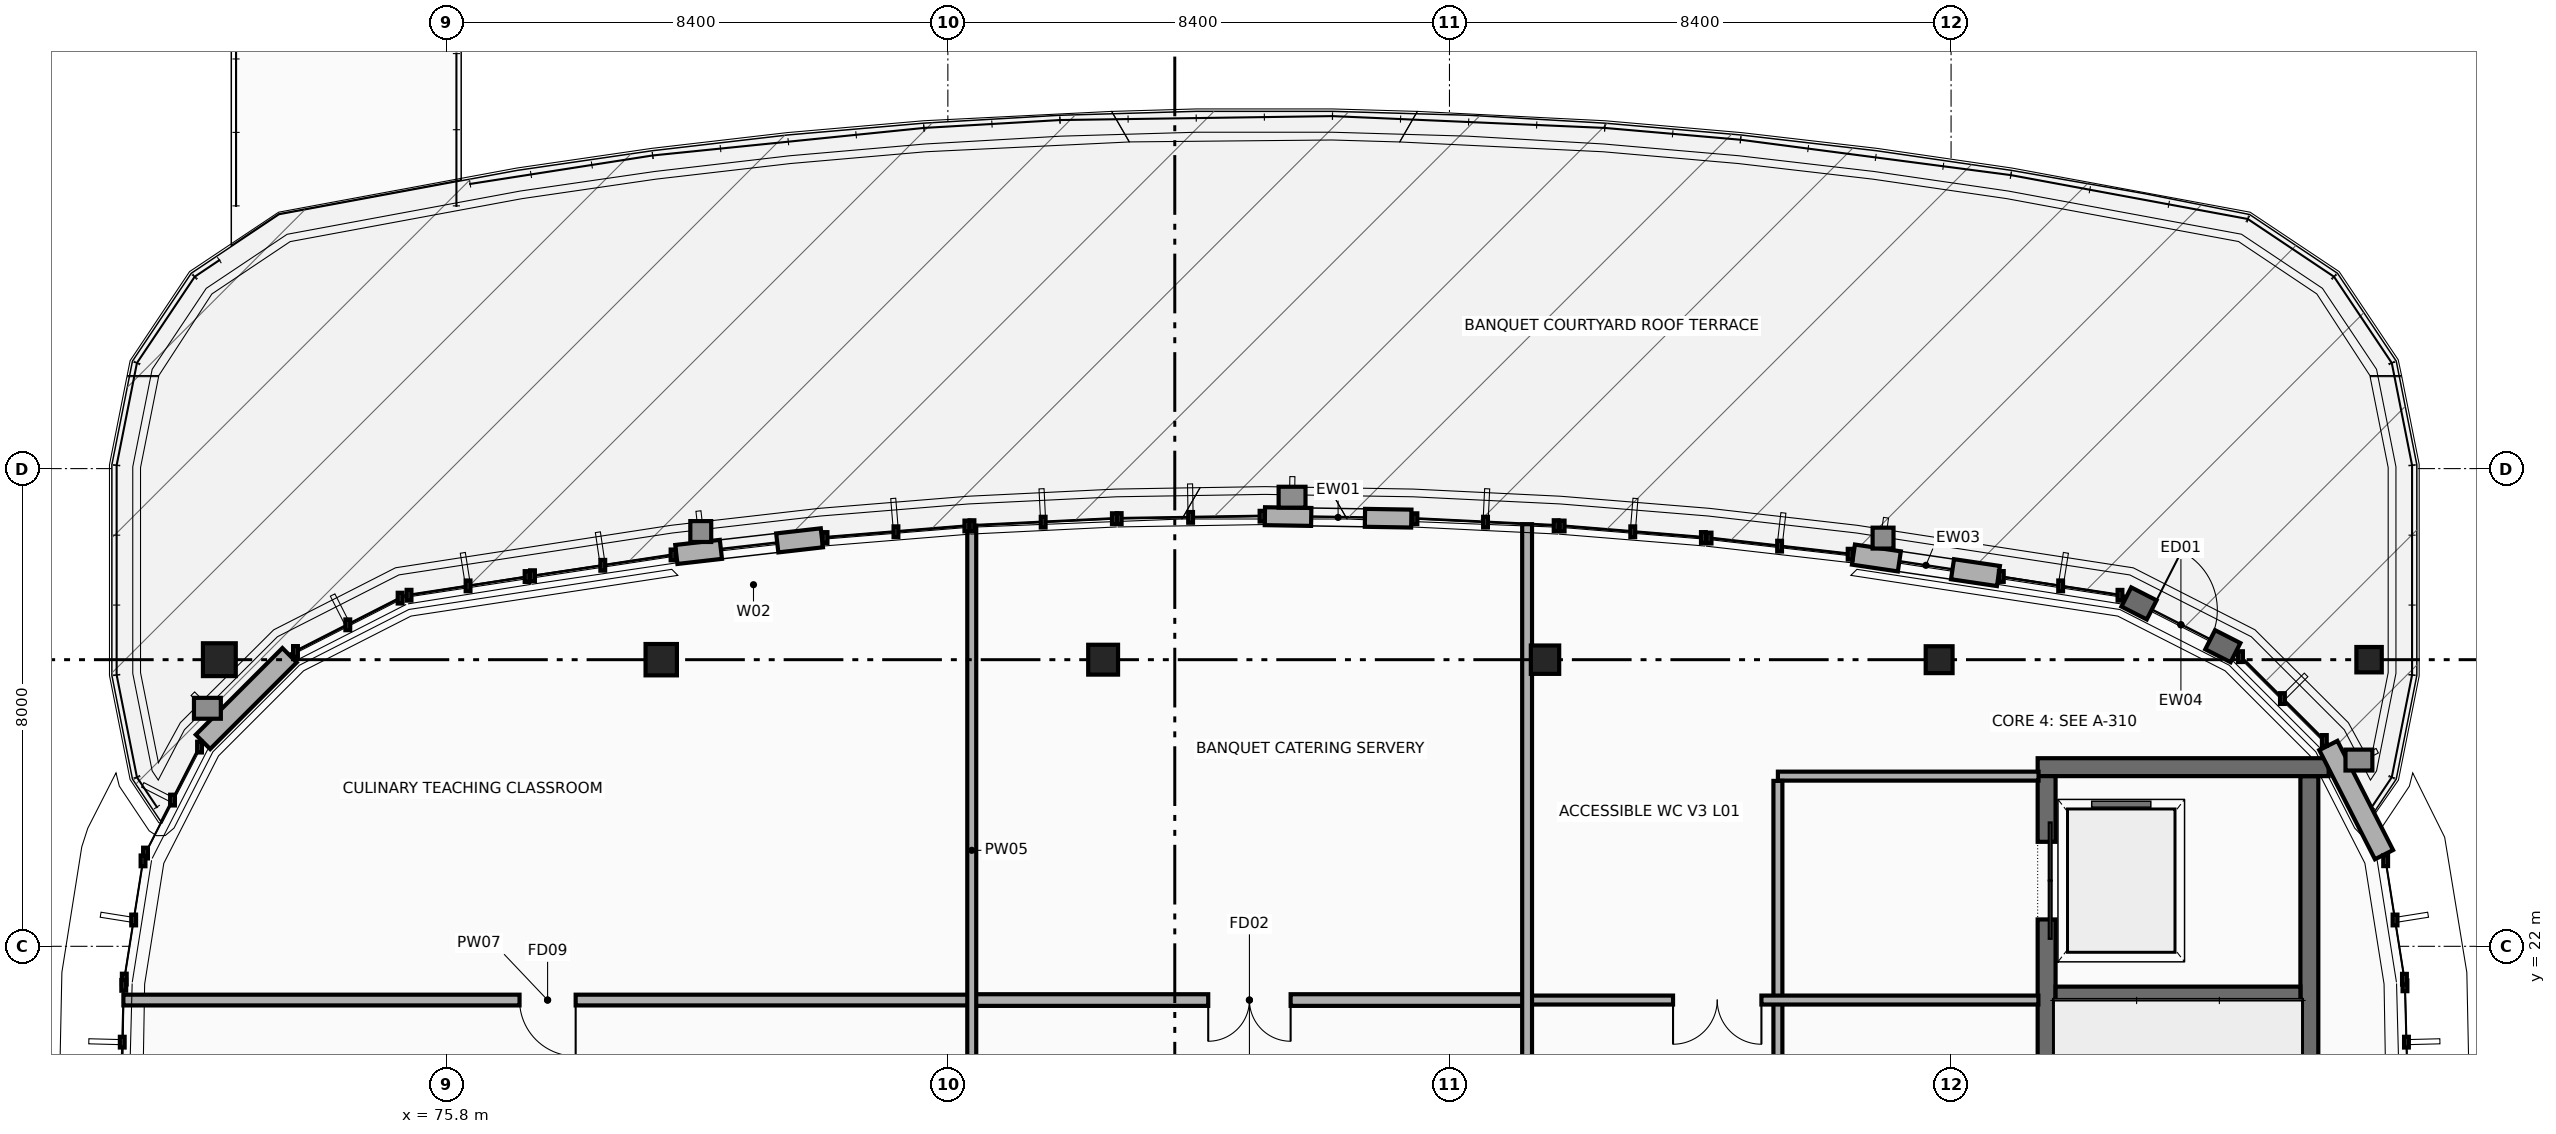
"""IFC4 building model, lengths in metres.
Left out: names, types, materials, properties, quantities, classifications, styles, units other than length and angle.
Written with IfcOpenShell. Run it as: python <this file> out.ifc"""

import sys

from ifc_helpers import new_model, si_unit, direction, frame, frame_2d, origin, origin_2d, place, context, subcontext, project, spatial, rectangle, extrude, element, fill, save


model = new_model("IFC4")
c1 = context("Model", 3, precision=1e-05, world=origin(), true_north=direction((0.0, 1.0)))
c2 = subcontext(c1, "Body", "Model", "MODEL_VIEW")
j1 = project(units=[si_unit("LENGTHUNIT", "METRE"), si_unit("PLANEANGLEUNIT", "RADIAN")], contexts=[c1])
p1 = place(None, origin())
s1 = spatial("IfcSite", under=j1, at=p1, CompositionType="ELEMENT")
p2 = place(p1, origin())
s2 = spatial("IfcBuilding", under=s1, at=p2, CompositionType="ELEMENT")
p3 = place(p2, frame((0.0, 0.0, 4.8)))
s3 = spatial("IfcBuildingStorey", under=s2, at=p3, CompositionType="ELEMENT", Elevation=4.8)
p4 = place(p3, frame((107.0, 13.55, 0.0), z_axis=(0.0, 0.0, 1.0), x_axis=(0.0, 1.0, 0.0)))
e1 = element("IfcWall", 1, at=p4, inside=s3, PredefinedType="SHEAR", context=c2, shape_type="SweptSolid", body=[
    extrude(rectangle(XDim=11.3, YDim=0.3, at=frame_2d((5.65, 0.0))), origin(), (0.0, 0.0, 1.0), 3.9),
])
p5 = place(p3, frame((107.323, 25.0, 0.0), z_axis=(0.0, 0.0, 1.0), x_axis=(-1.0, 0.0, 0.0)))
e2 = element("IfcWall", 2, at=p5, inside=s3, PredefinedType="SHEAR", context=c2, shape_type="SweptSolid", body=[
    extrude(rectangle(XDim=4.873, YDim=0.3, at=frame_2d((2.437, 0.0))), origin(), (0.0, 0.0, 1.0), 3.9),
])
p6 = place(p3, frame((102.6, 24.85, 0.0), z_axis=(0.0, 0.0, 1.0), x_axis=(0.0, -1.0, 0.0)))
e3 = element("IfcWall", 3, at=p6, inside=s3, PredefinedType="SHEAR", context=c2, shape_type="SweptSolid", body=[
    extrude(rectangle(XDim=11.3, YDim=0.3, at=frame_2d((5.65, 0.0))), origin(), (0.0, 0.0, 1.0), 3.9),
])
p7 = place(p6, frame((1.1, 0.0, 0.0)))
e4 = element("IfcOpeningElement", 4, at=p7, cuts=e3, PredefinedType="OPENING", context=c2, shape_type="SweptSolid", body=[
    extrude(rectangle(XDim=1.3, YDim=2.25, at=frame_2d((0.65, 1.125))), frame((0.0, 0.16, 0.0), z_axis=(0.0, -1.0, 0.0), x_axis=(1.0, 0.0, 0.0)), (0.0, 0.0, 1.0), 0.32),
])
p8 = place(p6, frame((9.97, 0.0, 0.0)))
e5 = element("IfcOpeningElement", 5, at=p8, cuts=e3, PredefinedType="OPENING", context=c2, shape_type="SweptSolid", body=[
    extrude(rectangle(XDim=1.06, YDim=2.15, at=frame_2d((0.53, 1.075))), frame((0.0, 0.16, 0.0), z_axis=(0.0, -1.0, 0.0), x_axis=(1.0, 0.0, 0.0)), (0.0, 0.0, 1.0), 0.32),
])
p9 = place(p3, frame((102.75, 21.2, 0.0), z_axis=(0.0, 0.0, 1.0), x_axis=(1.0, 0.0, 0.0)))
e6 = element("IfcWall", 6, at=p9, inside=s3, PredefinedType="SHEAR", context=c2, shape_type="SweptSolid", body=[
    extrude(rectangle(XDim=4.1, YDim=0.25, at=frame_2d((2.05, 0.0))), origin(), (0.0, 0.0, 1.0), 3.9),
])
p10 = place(p3, frame((72.0, 26.8, 0.0), z_axis=(0.0, 0.0, 1.0), x_axis=(1.0, 0.0, 0.0)))
e7 = element("IfcColumn", 7, at=p10, inside=s3, PredefinedType="COLUMN", context=c2, shape_type="SweptSolid", body=[
    extrude(rectangle(XDim=0.55, YDim=0.55, at=origin_2d()), origin(), (0.0, 0.0, 1.0), 3.9),
])
p11 = place(p3, frame((79.4, 26.8, 0.0), z_axis=(0.0, 0.0, 1.0), x_axis=(1.0, 0.0, 0.0)))
e8 = element("IfcColumn", 8, at=p11, inside=s3, PredefinedType="COLUMN", context=c2, shape_type="SweptSolid", body=[
    extrude(rectangle(XDim=0.525, YDim=0.525, at=origin_2d()), origin(), (0.0, 0.0, 1.0), 3.9),
])
p12 = place(p3, frame((86.8, 26.8, 0.0), z_axis=(0.0, 0.0, 1.0), x_axis=(1.0, 0.0, 0.0)))
e9 = element("IfcColumn", 9, at=p12, inside=s3, PredefinedType="COLUMN", context=c2, shape_type="SweptSolid", body=[
    extrude(rectangle(XDim=0.5, YDim=0.5, at=origin_2d()), origin(), (0.0, 0.0, 1.0), 3.9),
])
p13 = place(p3, frame((94.2, 26.8, 0.0), z_axis=(0.0, 0.0, 1.0), x_axis=(1.0, 0.0, 0.0)))
e10 = element("IfcColumn", 10, at=p13, inside=s3, PredefinedType="COLUMN", context=c2, shape_type="SweptSolid", body=[
    extrude(rectangle(XDim=0.475, YDim=0.475, at=origin_2d()), origin(), (0.0, 0.0, 1.0), 3.9),
])
p14 = place(p3, frame((100.8, 26.8, 0.0), z_axis=(0.0, 0.0, 1.0), x_axis=(1.0, 0.0, 0.0)))
e11 = element("IfcColumn", 11, at=p14, inside=s3, PredefinedType="COLUMN", context=c2, shape_type="SweptSolid", body=[
    extrude(rectangle(XDim=0.45, YDim=0.45, at=origin_2d()), origin(), (0.0, 0.0, 1.0), 3.9),
])
p15 = place(p3, frame((108.0, 26.8, 0.0), z_axis=(0.0, 0.0, 1.0), x_axis=(1.0, 0.0, 0.0)))
e12 = element("IfcColumn", 12, at=p15, inside=s3, PredefinedType="COLUMN", context=c2, shape_type="SweptSolid", body=[
    extrude(rectangle(XDim=0.425, YDim=0.425, at=origin_2d()), origin(), (0.0, 0.0, 1.0), 3.9),
])
p16 = place(p3, frame((107.318, 25.363, 0.0), z_axis=(0.0, 0.0, 1.0), x_axis=(0.454148561407, -0.890925970085, 0.0)))
e13 = element("IfcWall", 13, at=p16, inside=s3, PredefinedType="STANDARD", context=c2, shape_type="SweptSolid", body=[
    extrude(rectangle(XDim=2.052, YDim=0.34, at=frame_2d((1.026, 0.0))), origin(), (0.0, 0.0, 1.0), 2.97),
])
p17 = place(p3, frame((103.935, 27.85, 0.0), z_axis=(0.0, 0.0, 1.0), x_axis=(0.890853274035, -0.454291144686, 0.0)))
e14 = element("IfcWall", 14, at=p17, inside=s3, PredefinedType="STANDARD", context=c2, shape_type="SweptSolid", body=[
    extrude(rectangle(XDim=2.052, YDim=0.36, at=frame_2d((1.026, 0.0))), origin(), (0.0, 0.0, 1.0), 3.188),
])
p18 = place(p17, frame((0.476, 0.0, 0.0)))
e15 = element("IfcOpeningElement", 15, at=p18, cuts=e14, PredefinedType="OPENING", context=c2, shape_type="SweptSolid", body=[
    extrude(rectangle(XDim=1.1, YDim=2.2, at=frame_2d((0.55, 1.1))), frame((0.0, 0.19, 0.0), z_axis=(0.0, -1.0, 0.0), x_axis=(1.0, 0.0, 0.0)), (0.0, 0.0, 1.0), 0.38),
])
p19 = place(p3, frame((99.365, 28.56, 0.0), z_axis=(0.0, 0.0, 1.0), x_axis=(0.98923708278, -0.146321543365, 0.0)))
e16 = element("IfcWall", 16, at=p19, inside=s3, PredefinedType="STANDARD", context=c2, shape_type="SweptSolid", body=[
    extrude(rectangle(XDim=2.454, YDim=0.34, at=frame_2d((1.227, 0.0))), origin(), (0.0, 0.0, 1.0), 3.612),
])
p20 = place(p19, frame((0.777, 0.0, 0.9)))
e17 = element("IfcOpeningElement", 17, at=p20, cuts=e16, PredefinedType="OPENING", context=c2, shape_type="SweptSolid", body=[
    extrude(rectangle(XDim=0.9, YDim=1.2, at=frame_2d((0.45, 0.6))), frame((0.0, 0.18, 0.0), z_axis=(0.0, -1.0, 0.0), x_axis=(1.0, 0.0, 0.0)), (0.0, 0.0, 1.0), 0.36),
])
p21 = place(p3, frame((89.509, 29.203, 0.0), z_axis=(0.0, 0.0, 1.0), x_axis=(0.999868316156, -0.01622807284, 0.0)))
e18 = element("IfcWall", 18, at=p21, inside=s3, PredefinedType="STANDARD", context=c2, shape_type="SweptSolid", body=[
    extrude(rectangle(XDim=2.452, YDim=0.3, at=frame_2d((1.226, 0.0))), origin(), (0.0, 0.0, 1.0), 3.612),
])
p22 = place(p21, frame((0.776, 0.0, 0.9)))
e19 = element("IfcOpeningElement", 19, at=p22, cuts=e18, PredefinedType="OPENING", context=c2, shape_type="SweptSolid", body=[
    extrude(rectangle(XDim=0.9, YDim=1.2, at=frame_2d((0.45, 0.6))), frame((0.0, 0.16, 0.0), z_axis=(0.0, -1.0, 0.0), x_axis=(1.0, 0.0, 0.0)), (0.0, 0.0, 1.0), 0.32),
])
p23 = place(p3, frame((79.653, 28.562, 0.0), z_axis=(0.0, 0.0, 1.0), x_axis=(0.993507947112, 0.113762731271, 0.0)))
e20 = element("IfcWall", 20, at=p23, inside=s3, PredefinedType="STANDARD", context=c2, shape_type="SweptSolid", body=[
    extrude(rectangle(XDim=2.453, YDim=0.32, at=frame_2d((1.227, 0.0))), origin(), (0.0, 0.0, 1.0), 3.612),
])
p24 = place(p23, frame((0.751, 0.0, 0.9)))
e21 = element("IfcOpeningElement", 21, at=p24, cuts=e20, PredefinedType="OPENING", context=c2, shape_type="SweptSolid", body=[
    extrude(rectangle(XDim=0.95, YDim=1.5, at=frame_2d((0.475, 0.75))), frame((0.0, 0.17, 0.0), z_axis=(0.0, -1.0, 0.0), x_axis=(1.0, 0.0, 0.0)), (0.0, 0.0, 1.0), 0.34),
])
p25 = place(p3, frame((71.726, 25.424, 0.0), z_axis=(0.0, 0.0, 1.0), x_axis=(0.707106781187, 0.707106781187, 0.0)))
e22 = element("IfcWall", 22, at=p25, inside=s3, PredefinedType="STANDARD", context=c2, shape_type="SweptSolid", body=[
    extrude(rectangle(XDim=2.051, YDim=0.34, at=frame_2d((1.025, 0.0))), origin(), (0.0, 0.0, 1.0), 3.12),
])
p26 = place(p3, frame((102.465, 24.85, 0.0), z_axis=(0.0, 0.0, 1.0), x_axis=(-1.0, 0.0, 0.0)))
e23 = element("IfcWall", 23, at=p26, inside=s3, PredefinedType="PARTITIONING", context=c2, shape_type="SweptSolid", body=[
    extrude(rectangle(XDim=4.365, YDim=0.15, at=frame_2d((2.183, 0.0))), origin(), (0.0, 0.0, 1.0), 2.995),
])
p27 = place(p3, frame((98.1, 24.77, 0.0), z_axis=(0.0, 0.0, 1.0), x_axis=(0.0, -1.0, 0.0)))
e24 = element("IfcWall", 24, at=p27, inside=s3, PredefinedType="PARTITIONING", context=c2, shape_type="SweptSolid", body=[
    extrude(rectangle(XDim=11.14, YDim=0.15, at=frame_2d((5.57, 0.0))), origin(), (0.0, 0.0, 1.0), 3.232),
])
p28 = place(p27, frame((4.88, 0.0, 0.0)))
e25 = element("IfcOpeningElement", 25, at=p28, cuts=e24, PredefinedType="OPENING", context=c2, shape_type="SweptSolid", body=[
    extrude(rectangle(XDim=1.38, YDim=2.2, at=frame_2d((0.69, 1.1))), frame((0.0, 0.085, 0.0), z_axis=(0.0, -1.0, 0.0), x_axis=(1.0, 0.0, 0.0)), (0.0, 0.0, 1.0), 0.17),
])
p29 = place(p3, frame((84.6, 21.1, 0.0), z_axis=(0.0, 0.0, 1.0), x_axis=(-1.0, 0.0, 0.0)))
e26 = element("IfcWall", 26, at=p29, inside=s3, PredefinedType="PARTITIONING", context=c2, shape_type="SweptSolid", body=[
    extrude(rectangle(XDim=14.207, YDim=0.18, at=frame_2d((7.104, 0.0))), origin(), (0.0, 0.0, 1.0), 3.095),
])
p30 = place(p29, frame((6.633, 0.0, 0.0)))
e27 = element("IfcOpeningElement", 27, at=p30, cuts=e26, PredefinedType="OPENING", context=c2, shape_type="SweptSolid", body=[
    extrude(rectangle(XDim=0.94, YDim=2.1, at=frame_2d((0.47, 1.05))), frame((0.0, 0.1, 0.0), z_axis=(0.0, -1.0, 0.0), x_axis=(1.0, 0.0, 0.0)), (0.0, 0.0, 1.0), 0.2),
])
p31 = place(p3, frame((93.9, 21.1, 0.0), z_axis=(0.0, 0.0, 1.0), x_axis=(-1.0, 0.0, 0.0)))
e28 = element("IfcWall", 28, at=p31, inside=s3, PredefinedType="PARTITIONING", context=c2, shape_type="SweptSolid", body=[
    extrude(rectangle(XDim=9.3, YDim=0.195, at=frame_2d((4.65, 0.0))), origin(), (0.0, 0.0, 1.0), 3.07),
])
p32 = place(p31, frame((3.96, 0.0, 0.0)))
e29 = element("IfcOpeningElement", 29, at=p32, cuts=e28, PredefinedType="OPENING", context=c2, shape_type="SweptSolid", body=[
    extrude(rectangle(XDim=1.38, YDim=2.2, at=frame_2d((0.69, 1.1))), frame((0.0, 0.107, 0.0), z_axis=(0.0, -1.0, 0.0), x_axis=(1.0, 0.0, 0.0)), (0.0, 0.0, 1.0), 0.215),
])
p33 = place(p3, frame((102.462, 21.1, 0.0), z_axis=(0.0, 0.0, 1.0), x_axis=(-1.0, 0.0, 0.0)))
e30 = element("IfcWall", 30, at=p33, inside=s3, PredefinedType="PARTITIONING", context=c2, shape_type="SweptSolid", body=[
    extrude(rectangle(XDim=8.562, YDim=0.15, at=frame_2d((4.281, 0.0))), origin(), (0.0, 0.0, 1.0), 2.995),
])
p34 = place(p33, frame((4.638, 0.0, 0.0)))
e31 = element("IfcOpeningElement", 31, at=p34, cuts=e30, PredefinedType="OPENING", context=c2, shape_type="SweptSolid", body=[
    extrude(rectangle(XDim=1.48, YDim=2.22, at=frame_2d((0.74, 1.11))), frame((0.0, 0.085, 0.0), z_axis=(0.0, -1.0, 0.0), x_axis=(1.0, 0.0, 0.0)), (0.0, 0.0, 1.0), 0.17),
])
p35 = place(p3, frame((84.6, 18.171, 0.0), z_axis=(0.0, 0.0, 1.0), x_axis=(0.0, 1.0, 0.0)))
e32 = element("IfcWall", 32, at=p35, inside=s3, PredefinedType="PARTITIONING", context=c2, shape_type="SweptSolid", body=[
    extrude(rectangle(XDim=10.873, YDim=0.15, at=frame_2d((5.437, 0.0))), origin(), (0.0, 0.0, 1.0), 3.236),
])
p36 = place(p3, frame((93.9, 18.171, 0.0), z_axis=(0.0, 0.0, 1.0), x_axis=(0.0, 1.0, 0.0)))
e33 = element("IfcWall", 33, at=p36, inside=s3, PredefinedType="PARTITIONING", context=c2, shape_type="SweptSolid", body=[
    extrude(rectangle(XDim=10.898, YDim=0.165, at=frame_2d((5.449, 0.0))), origin(), (0.0, 0.0, 1.0), 3.045),
])
p37 = place(p18, origin())
e34 = element("IfcDoor", 34, at=p37, inside=s3, OperationType="SINGLE_SWING_LEFT", PredefinedType="DOOR", context=c2, shape_type="SweptSolid", body=[
    extrude(rectangle(XDim=1.1, YDim=2.2, at=frame_2d((0.55, 1.1))), frame((0.0, 0.025, 0.0), z_axis=(0.0, -1.0, 0.0), x_axis=(1.0, 0.0, 0.0)), (0.0, 0.0, 1.0), 0.05),
])
fill(e15, e34)
p38 = place(p20, origin())
e35 = element("IfcWindow", 35, at=p38, inside=s3, PartitioningType="SINGLE_PANEL", PredefinedType="WINDOW", context=c2, shape_type="SweptSolid", body=[
    extrude(rectangle(XDim=0.9, YDim=1.2, at=frame_2d((0.45, 0.6))), frame((0.0, 0.03, 0.0), z_axis=(0.0, -1.0, 0.0), x_axis=(1.0, 0.0, 0.0)), (0.0, 0.0, 1.0), 0.06),
])
fill(e17, e35)
p39 = place(p22, origin())
e36 = element("IfcWindow", 36, at=p39, inside=s3, PartitioningType="SINGLE_PANEL", PredefinedType="WINDOW", context=c2, shape_type="SweptSolid", body=[
    extrude(rectangle(XDim=0.9, YDim=1.2, at=frame_2d((0.45, 0.6))), frame((0.0, 0.03, 0.0), z_axis=(0.0, -1.0, 0.0), x_axis=(1.0, 0.0, 0.0)), (0.0, 0.0, 1.0), 0.06),
])
fill(e19, e36)
p40 = place(p24, origin())
e37 = element("IfcWindow", 37, at=p40, inside=s3, PartitioningType="SINGLE_PANEL", PredefinedType="WINDOW", context=c2, shape_type="SweptSolid", body=[
    extrude(rectangle(XDim=0.95, YDim=1.5, at=frame_2d((0.475, 0.75))), frame((0.0, 0.03, 0.0), z_axis=(0.0, -1.0, 0.0), x_axis=(1.0, 0.0, 0.0)), (0.0, 0.0, 1.0), 0.06),
])
fill(e21, e37)
p41 = place(p7, origin())
e38 = element("IfcDoor", 38, at=p41, inside=s3, OperationType="DOUBLE_DOOR_SLIDING", PredefinedType="DOOR", context=c2, shape_type="SweptSolid", body=[
    extrude(rectangle(XDim=1.3, YDim=2.25, at=frame_2d((0.65, 1.125))), frame((0.0, 0.025, 0.0), z_axis=(0.0, -1.0, 0.0), x_axis=(1.0, 0.0, 0.0)), (0.0, 0.0, 1.0), 0.05),
])
fill(e4, e38)
p42 = place(p30, origin())
e39 = element("IfcDoor", 39, at=p42, inside=s3, OperationType="SINGLE_SWING_LEFT", PredefinedType="DOOR", context=c2, shape_type="SweptSolid", body=[
    extrude(rectangle(XDim=0.94, YDim=2.1, at=frame_2d((0.47, 1.05))), frame((0.0, 0.025, 0.0), z_axis=(0.0, -1.0, 0.0), x_axis=(1.0, 0.0, 0.0)), (0.0, 0.0, 1.0), 0.05),
])
fill(e27, e39)
p43 = place(p32, origin())
e40 = element("IfcDoor", 40, at=p43, inside=s3, OperationType="DOUBLE_DOOR_SINGLE_SWING", PredefinedType="DOOR", context=c2, shape_type="SweptSolid", body=[
    extrude(rectangle(XDim=1.38, YDim=2.2, at=frame_2d((0.69, 1.1))), frame((0.0, 0.025, 0.0), z_axis=(0.0, -1.0, 0.0), x_axis=(1.0, 0.0, 0.0)), (0.0, 0.0, 1.0), 0.05),
])
fill(e29, e40)
p44 = place(p34, origin())
e41 = element("IfcDoor", 41, at=p44, inside=s3, OperationType="DOUBLE_DOOR_SINGLE_SWING", PredefinedType="DOOR", context=c2, shape_type="SweptSolid", body=[
    extrude(rectangle(XDim=1.48, YDim=2.22, at=frame_2d((0.74, 1.11))), frame((0.0, 0.025, 0.0), z_axis=(0.0, -1.0, 0.0), x_axis=(1.0, 0.0, 0.0)), (0.0, 0.0, 1.0), 0.05),
])
fill(e31, e41)
save(model, sys.argv[1])
